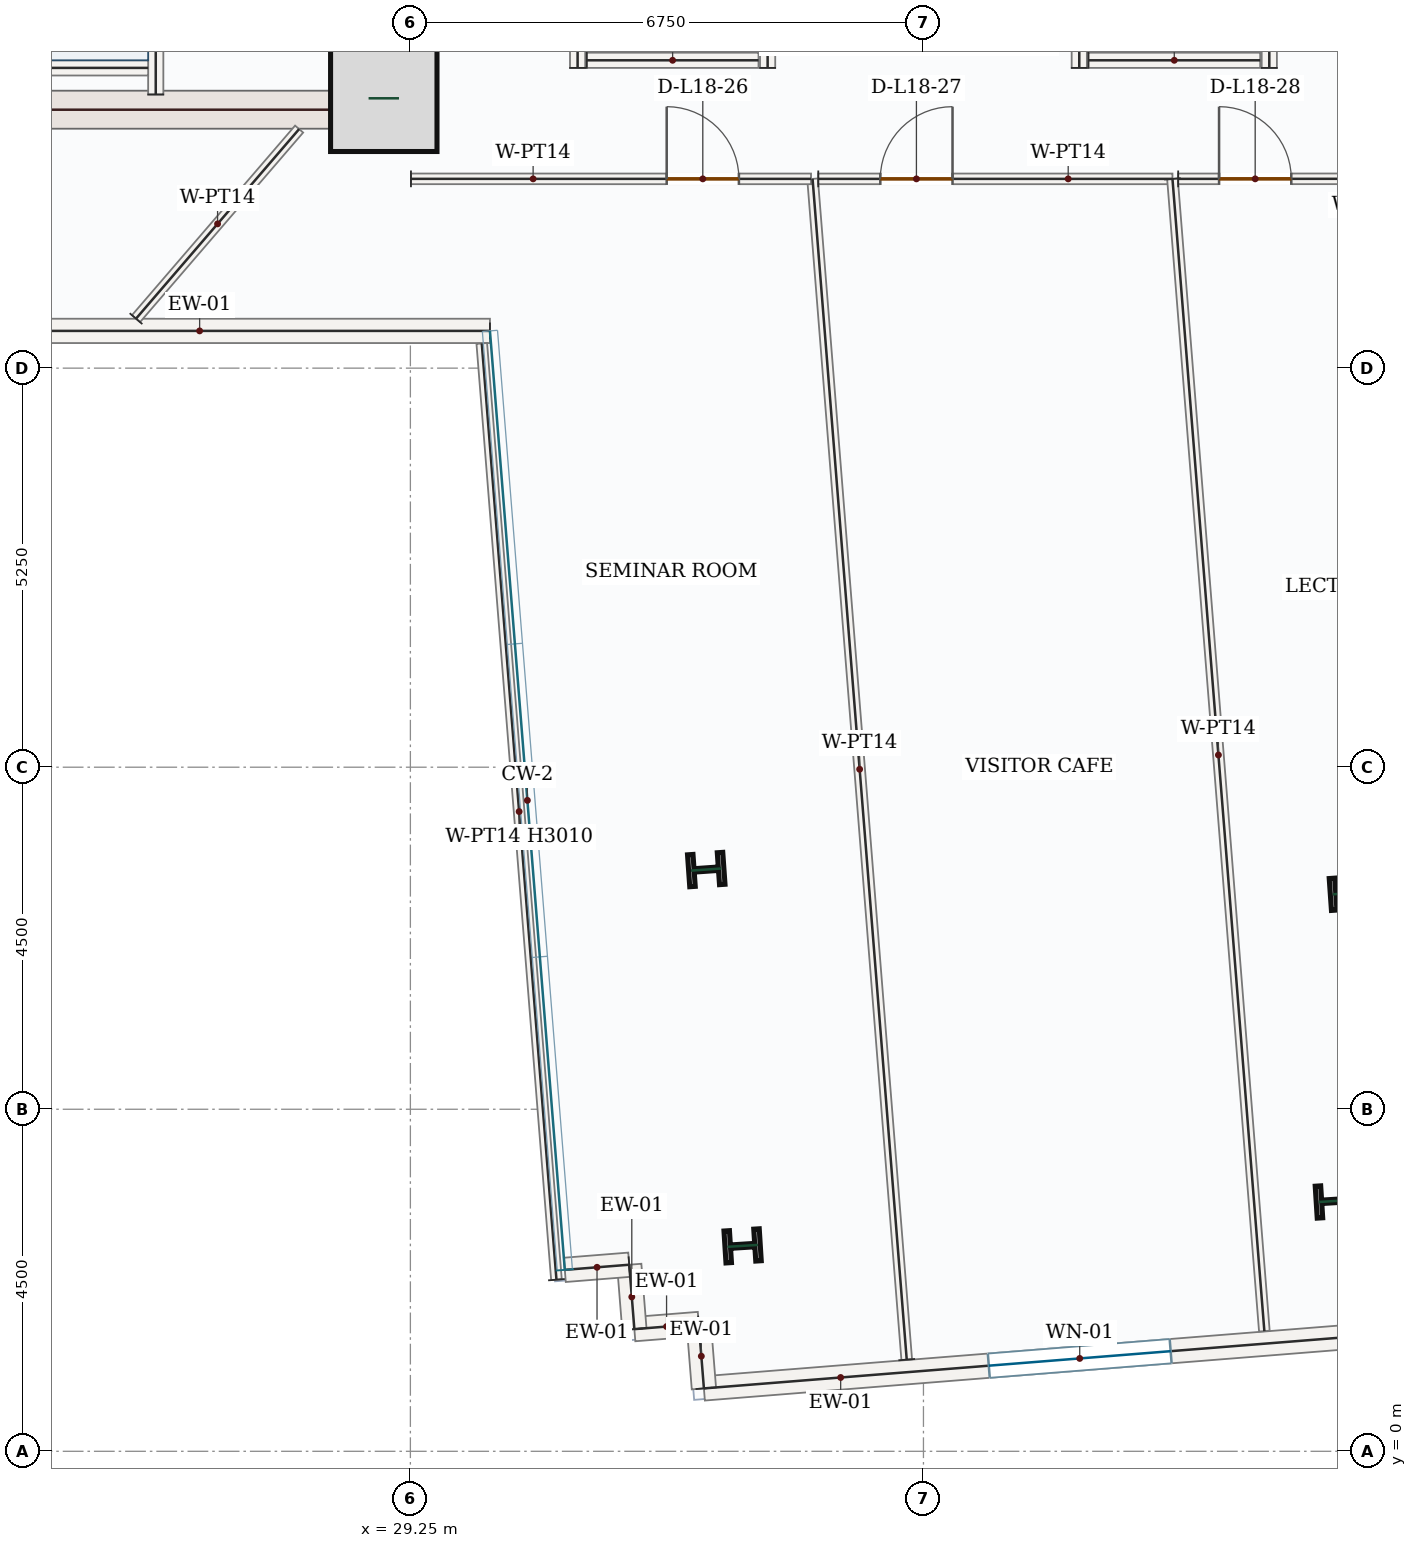
"""IFC4 building model, lengths in metres.
Left out: names, types, materials, properties, quantities, classifications, styles, units other than length and angle.
Written with IfcOpenShell. Run it as: python <this file> out.ifc"""

import sys

from ifc_helpers import new_model, si_unit, direction, frame, frame_2d, origin, origin_2d, place, context, subcontext, project, spatial, rectangle, i_section, extrude, source, transform, mapped, element, fill, save


model = new_model("IFC4")
c1 = context("Model", 3, precision=1e-05, world=origin(), true_north=direction((0.0, 1.0)))
c2 = subcontext(c1, "Body", "Model", "MODEL_VIEW")
j1 = project(units=[si_unit("LENGTHUNIT", "METRE"), si_unit("PLANEANGLEUNIT", "RADIAN")], contexts=[c1])
p1 = place(None, origin())
s1 = spatial("IfcSite", under=j1, at=p1, CompositionType="ELEMENT")
p2 = place(p1, origin())
s2 = spatial("IfcBuilding", under=s1, at=p2, CompositionType="ELEMENT")
p3 = place(p2, frame((0.0, 0.0, 83.7)))
s3 = spatial("IfcBuildingStorey", under=s2, at=p3, CompositionType="ELEMENT", Elevation=83.7)
p4 = place(p3, frame((29.0, 17.4, 0.0), z_axis=(0.0, 0.0, 1.0), x_axis=(0.0, 1.0, 0.0)))
e1 = element("IfcWall", 1, at=p4, inside=s3, PredefinedType="SHEAR", context=c2, shape_type="SweptSolid", body=[
    extrude(rectangle(XDim=8.55, YDim=0.5, at=frame_2d((4.275, 0.0))), origin(), (0.0, 0.0, 1.0), 3.95),
])
p5 = place(p4, frame((6.65, 0.0, 0.0)))
e2 = element("IfcOpeningElement", 2, at=p5, cuts=e1, PredefinedType="OPENING", context=c2, shape_type="SweptSolid", body=[
    extrude(rectangle(XDim=1.1, YDim=2.2, at=frame_2d((0.55, 1.1))), frame((0.0, 0.26, 0.0), z_axis=(0.0, -1.0, 0.0), x_axis=(1.0, 0.0, 0.0)), (0.0, 0.0, 1.0), 0.52),
])
p6 = place(p4, frame((2.15, 0.0, 0.0)))
e3 = element("IfcOpeningElement", 3, at=p6, cuts=e1, PredefinedType="OPENING", context=c2, shape_type="SweptSolid", body=[
    extrude(rectangle(XDim=0.88, YDim=2.1, at=frame_2d((0.44, 1.05))), frame((0.0, 0.26, 0.0), z_axis=(0.0, -1.0, 0.0), x_axis=(1.0, 0.0, 0.0)), (0.0, 0.0, 1.0), 0.52),
])
p7 = place(p4, frame((4.25, 0.0, 0.0)))
e4 = element("IfcOpeningElement", 4, at=p7, cuts=e1, PredefinedType="OPENING", context=c2, shape_type="SweptSolid", body=[
    extrude(rectangle(XDim=0.88, YDim=2.1, at=frame_2d((0.44, 1.05))), frame((0.0, 0.26, 0.0), z_axis=(0.0, -1.0, 0.0), x_axis=(1.0, 0.0, 0.0)), (0.0, 0.0, 1.0), 0.52),
])
m1 = source(origin(), c2, "Body", "SweptSolid", [
    extrude(rectangle(XDim=7.0, YDim=0.5, at=frame_2d((3.5, 0.0))), origin(), (0.0, 0.0, 1.0), 3.95),
])
p8 = place(p3, frame((21.75, 17.65, 0.0), z_axis=(0.0, 0.0, 1.0), x_axis=(1.0, 0.0, 0.0)))
e5 = element("IfcWall", 5, at=p8, inside=s3, PredefinedType="SHEAR", context=c2, shape_type="MappedRepresentation", body=[
    mapped(m1, transform((0.0, 0.0, 0.0), x_axis=(1.0, 0.0, 0.0), y_axis=(0.0, 1.0, 0.0), z_axis=(0.0, 0.0, 1.0), scale=1.0)),
])
m2 = source(origin(), c2, "Body", "SweptSolid", [
    extrude(rectangle(XDim=1.4, YDim=1.4, at=origin_2d()), origin(), (0.0, 0.0, 1.0), 4.2),
])
p9 = place(p3, frame((28.9, 17.8, 0.0), z_axis=(0.0, 0.0, 1.0), x_axis=(1.0, 0.0, 0.0)))
e6 = element("IfcColumn", 6, at=p9, inside=s3, PredefinedType="COLUMN", context=c2, shape_type="MappedRepresentation", body=[
    mapped(m2, transform((0.0, 0.0, 0.0), x_axis=(1.0, 0.0, 0.0), y_axis=(0.0, 1.0, 0.0), z_axis=(0.0, 0.0, 1.0), scale=1.0)),
])
m3 = source(origin(), c2, "Body", "SweptSolid", [
    extrude(i_section(OverallWidth=0.421, OverallDepth=0.465, WebThickness=0.045, FlangeThickness=0.073, FilletRadius=0.018, at=origin_2d()), origin(), (0.0, 0.0, 1.0), 4.2),
])
for number, where, z_axis, x_axis in (
    (7, (33.143, 7.654, 0.0), (0.0, 0.0, 1.0), (-0.07, 0.998, 0.0)),
    (8, (41.585, 7.342, 0.0), (0.0, 0.0, 1.0), (-0.07, 0.998, 0.0)),
    (9, (33.621, 2.703, 0.0), (0.0, 0.0, 1.0), (-0.063, 0.998, 0.0)),
    (10, (41.399, 3.292, 0.0), (0.0, 0.0, 1.0), (-0.063, 0.998, 0.0)),
):
    element("IfcColumn", number, at=place(p3, frame(where, z_axis=z_axis, x_axis=x_axis)), inside=s3, PredefinedType="COLUMN", context=c2, shape_type="MappedRepresentation", body=[
        mapped(m3, transform((0.0, 0.0, 0.0), x_axis=(1.0, 0.0, 0.0), y_axis=(0.0, 1.0, 0.0), z_axis=(0.0, 0.0, 1.0), scale=1.0)),
    ])
p10 = place(p3, frame((43.0, 1.616, 0.0), z_axis=(0.0, 0.0, 1.0), x_axis=(-0.996833485558, -0.079517306731, 0.0)))
e11 = element("IfcWall", 11, at=p10, inside=s3, PredefinedType="SOLIDWALL", context=c2, shape_type="SweptSolid", body=[
    extrude(rectangle(XDim=9.92, YDim=0.32, at=frame_2d((4.96, 0.0))), origin(), (0.0, 0.0, 1.0), 3.95),
])
p11 = place(p10, frame((3.76, 0.0, 0.85)))
e12 = element("IfcOpeningElement", 12, at=p11, cuts=e11, PredefinedType="OPENING", context=c2, shape_type="SweptSolid", body=[
    extrude(rectangle(XDim=2.4, YDim=1.8, at=frame_2d((1.2, 0.9))), frame((0.0, 0.17, 0.0), z_axis=(0.0, -1.0, 0.0), x_axis=(1.0, 0.0, 0.0)), (0.0, 0.0, 1.0), 0.34),
])
m4 = source(origin(), c2, "Body", "SweptSolid", [
    extrude(rectangle(XDim=0.85, YDim=0.32, at=frame_2d((0.425, 0.0))), origin(), (0.0, 0.0, 1.0), 3.95),
])
p12 = place(p3, frame((33.112, 0.827, 0.0), z_axis=(0.0, 0.0, 1.0), x_axis=(-0.079551174585, 0.996830783344, 0.0)))
e13 = element("IfcWall", 13, at=p12, inside=s3, PredefinedType="SOLIDWALL", context=c2, shape_type="MappedRepresentation", body=[
    mapped(m4, transform((0.0, 0.0, 0.0), x_axis=(1.0, 0.0, 0.0), y_axis=(0.0, 1.0, 0.0), z_axis=(0.0, 0.0, 1.0), scale=1.0)),
])
m5 = source(origin(), c2, "Body", "SweptSolid", [
    extrude(rectangle(XDim=0.85, YDim=0.32, at=frame_2d((0.425, 0.0))), origin(), (0.0, 0.0, 1.0), 3.95),
])
for number, where, z_axis, x_axis in (
    (14, (33.044, 1.675, 0.0), (0.0, 0.0, 1.0), (-0.997, -0.079, 0.0)),
    (15, (32.197, 1.607, 0.0), (0.0, 0.0, 1.0), (-0.08, 0.997, 0.0)),
):
    element("IfcWall", number, at=place(p3, frame(where, z_axis=z_axis, x_axis=x_axis)), inside=s3, PredefinedType="SOLIDWALL", context=c2, shape_type="MappedRepresentation", body=[
        mapped(m5, transform((0.0, 0.0, 0.0), x_axis=(1.0, 0.0, 0.0), y_axis=(0.0, 1.0, 0.0), z_axis=(0.0, 0.0, 1.0), scale=1.0)),
    ])
p13 = place(p3, frame((32.129, 2.455, 0.0), z_axis=(0.0, 0.0, 1.0), x_axis=(-0.996830783344, -0.079551174585, 0.0)))
e16 = element("IfcWall", 16, at=p13, inside=s3, PredefinedType="SOLIDWALL", context=c2, shape_type="MappedRepresentation", body=[
    mapped(m4, transform((0.0, 0.0, 0.0), x_axis=(1.0, 0.0, 0.0), y_axis=(0.0, 1.0, 0.0), z_axis=(0.0, 0.0, 1.0), scale=1.0)),
])
m6 = source(origin(), c2, "Body", "SweptSolid", [
    extrude(rectangle(XDim=7.639, YDim=0.32, at=frame_2d((3.819, 0.0))), origin(), (0.0, 0.0, 1.0), 3.95),
])
p14 = place(p3, frame((30.297, 14.74, 0.0), z_axis=(0.0, 0.0, 1.0), x_axis=(-1.0, 0.0, 0.0)))
e17 = element("IfcWall", 17, at=p14, inside=s3, PredefinedType="SOLIDWALL", context=c2, shape_type="MappedRepresentation", body=[
    mapped(m6, transform((0.0, 0.0, 0.0), x_axis=(1.0, 0.0, 0.0), y_axis=(0.0, 1.0, 0.0), z_axis=(0.0, 0.0, 1.0), scale=1.0)),
])
p15 = place(p3, frame((25.9, 17.85, 0.0), z_axis=(0.0, 0.0, 1.0), x_axis=(0.0, 1.0, 0.0)))
e18 = element("IfcWall", 18, at=p15, inside=s3, PredefinedType="SOLIDWALL", context=c2, shape_type="SweptSolid", body=[
    extrude(rectangle(XDim=8.0, YDim=0.2, at=frame_2d((4.0, 0.0))), origin(), (0.0, 0.0, 1.0), 3.95),
])
p16 = place(p15, frame((6.3, 0.0, 0.0)))
e19 = element("IfcOpeningElement", 19, at=p16, cuts=e18, PredefinedType="OPENING", context=c2, shape_type="SweptSolid", body=[
    extrude(rectangle(XDim=1.05, YDim=2.15, at=frame_2d((0.525, 1.075))), frame((0.0, 0.11, 0.0), z_axis=(0.0, -1.0, 0.0), x_axis=(1.0, 0.0, 0.0)), (0.0, 0.0, 1.0), 0.22),
])
m7 = source(origin(), c2, "Body", "SweptSolid", [
    extrude(rectangle(XDim=3.25, YDim=0.2, at=frame_2d((1.625, 0.0))), origin(), (0.0, 0.0, 1.0), 3.95),
])
p17 = place(p3, frame((22.55, 18.2, 0.0), z_axis=(0.0, 0.0, 1.0), x_axis=(1.0, 0.0, 0.0)))
e20 = element("IfcWall", 20, at=p17, inside=s3, PredefinedType="SOLIDWALL", context=c2, shape_type="MappedRepresentation", body=[
    mapped(m7, transform((0.0, 0.0, 0.0), x_axis=(1.0, 0.0, 0.0), y_axis=(0.0, 1.0, 0.0), z_axis=(0.0, 0.0, 1.0), scale=1.0)),
])
m8 = source(origin(), c2, "Body", "SweptSolid", [
    extrude(rectangle(XDim=2.35, YDim=0.2, at=frame_2d((1.175, 0.0))), origin(), (0.0, 0.0, 1.0), 3.95),
])
for number, where, z_axis, x_axis in (
    (21, (31.45, 18.2, 0.0), (0.0, 0.0, 1.0), (0.0, 1.0, 0.0)),
    (22, (33.95, 18.2, 0.0), (0.0, 0.0, 1.0), (0.0, 1.0, 0.0)),
):
    element("IfcWall", number, at=place(p3, frame(where, z_axis=z_axis, x_axis=x_axis)), inside=s3, PredefinedType="SOLIDWALL", context=c2, shape_type="MappedRepresentation", body=[
        mapped(m8, transform((0.0, 0.0, 0.0), x_axis=(1.0, 0.0, 0.0), y_axis=(0.0, 1.0, 0.0), z_axis=(0.0, 0.0, 1.0), scale=1.0)),
    ])
m9 = source(origin(), c2, "Body", "SweptSolid", [
    extrude(rectangle(XDim=2.26, YDim=0.2, at=frame_2d((1.13, 0.0))), origin(), (0.0, 0.0, 1.0), 3.95),
])
p18 = place(p3, frame((31.57, 18.3, 0.0), z_axis=(0.0, 0.0, 1.0), x_axis=(1.0, 0.0, 0.0)))
e23 = element("IfcWall", 23, at=p18, inside=s3, PredefinedType="SOLIDWALL", context=c2, shape_type="MappedRepresentation", body=[
    mapped(m9, transform((0.0, 0.0, 0.0), x_axis=(1.0, 0.0, 0.0), y_axis=(0.0, 1.0, 0.0), z_axis=(0.0, 0.0, 1.0), scale=1.0)),
])
for number, where, z_axis, x_axis in (
    (24, (38.05, 18.2, 0.0), (0.0, 0.0, 1.0), (0.0, 1.0, 0.0)),
    (25, (40.55, 18.2, 0.0), (0.0, 0.0, 1.0), (0.0, 1.0, 0.0)),
):
    element("IfcWall", number, at=place(p3, frame(where, z_axis=z_axis, x_axis=x_axis)), inside=s3, PredefinedType="SOLIDWALL", context=c2, shape_type="MappedRepresentation", body=[
        mapped(m8, transform((0.0, 0.0, 0.0), x_axis=(1.0, 0.0, 0.0), y_axis=(0.0, 1.0, 0.0), z_axis=(0.0, 0.0, 1.0), scale=1.0)),
    ])
p19 = place(p3, frame((38.17, 18.3, 0.0), z_axis=(0.0, 0.0, 1.0), x_axis=(1.0, 0.0, 0.0)))
e26 = element("IfcWall", 26, at=p19, inside=s3, PredefinedType="SOLIDWALL", context=c2, shape_type="MappedRepresentation", body=[
    mapped(m9, transform((0.0, 0.0, 0.0), x_axis=(1.0, 0.0, 0.0), y_axis=(0.0, 1.0, 0.0), z_axis=(0.0, 0.0, 1.0), scale=1.0)),
])
m10 = source(origin(), c2, "Body", "SweptSolid", [
    extrude(rectangle(XDim=15.583, YDim=0.14, at=frame_2d((7.792, 0.0))), origin(), (0.0, 0.0, 1.0), 3.95),
])
p20 = place(p3, frame((35.78, 1.206, 0.0), z_axis=(0.0, 0.0, 1.0), x_axis=(-0.079507979427, 0.996834229552, 0.0)))
e27 = element("IfcWall", 27, at=p20, inside=s3, PredefinedType="PARTITIONING", context=c2, shape_type="MappedRepresentation", body=[
    mapped(m10, transform((0.0, 0.0, 0.0), x_axis=(1.0, 0.0, 0.0), y_axis=(0.0, 1.0, 0.0), z_axis=(0.0, 0.0, 1.0), scale=1.0)),
])
p21 = place(p3, frame((34.616, 16.74, 0.0), z_axis=(0.0, 0.0, 1.0), x_axis=(1.0, 0.0, 0.0)))
e28 = element("IfcWall", 28, at=p21, inside=s3, PredefinedType="PARTITIONING", context=c2, shape_type="SweptSolid", body=[
    extrude(rectangle(XDim=4.66, YDim=0.14, at=frame_2d((2.33, 0.0))), origin(), (0.0, 0.0, 1.0), 3.95),
])
p22 = place(p21, frame((0.816, 0.0, 0.0)))
e29 = element("IfcOpeningElement", 29, at=p22, cuts=e28, PredefinedType="OPENING", context=c2, shape_type="SweptSolid", body=[
    extrude(rectangle(XDim=0.95, YDim=2.15, at=frame_2d((0.475, 1.075))), frame((0.0, 0.08, 0.0), z_axis=(0.0, -1.0, 0.0), x_axis=(1.0, 0.0, 0.0)), (0.0, 0.0, 1.0), 0.16),
])
m11 = source(origin(), c2, "Body", "SweptSolid", [
    extrude(rectangle(XDim=15.207, YDim=0.14, at=frame_2d((7.604, 0.0))), origin(), (0.0, 0.0, 1.0), 3.95),
])
p23 = place(p3, frame((39.276, 16.74, 0.0), z_axis=(0.0, 0.0, 1.0), x_axis=(0.07950146843, -0.996834748851, 0.0)))
e30 = element("IfcWall", 30, at=p23, inside=s3, PredefinedType="PARTITIONING", context=c2, shape_type="MappedRepresentation", body=[
    mapped(m11, transform((0.0, 0.0, 0.0), x_axis=(1.0, 0.0, 0.0), y_axis=(0.0, 1.0, 0.0), z_axis=(0.0, 0.0, 1.0), scale=1.0)),
])
p24 = place(p3, frame((39.351, 16.74, 0.0), z_axis=(0.0, 0.0, 1.0), x_axis=(0.999999935369, 0.000359531148, 0.0)))
e31 = element("IfcWall", 31, at=p24, inside=s3, PredefinedType="PARTITIONING", context=c2, shape_type="SweptSolid", body=[
    extrude(rectangle(XDim=3.395, YDim=0.14, at=frame_2d((1.698, 0.0))), origin(), (0.0, 0.0, 1.0), 3.95),
])
p25 = place(p24, frame((0.538, 0.0, 0.0)))
e32 = element("IfcOpeningElement", 32, at=p25, cuts=e31, PredefinedType="OPENING", context=c2, shape_type="SweptSolid", body=[
    extrude(rectangle(XDim=0.95, YDim=2.15, at=frame_2d((0.475, 1.075))), frame((0.0, 0.08, 0.0), z_axis=(0.0, -1.0, 0.0), x_axis=(1.0, 0.0, 0.0)), (0.0, 0.0, 1.0), 0.16),
])
p26 = place(p3, frame((29.258, 16.74, 0.0), z_axis=(0.0, 0.0, 1.0), x_axis=(0.999999998924, -4.6384341e-05, 0.0)))
e33 = element("IfcWall", 33, at=p26, inside=s3, PredefinedType="PARTITIONING", context=c2, shape_type="SweptSolid", body=[
    extrude(rectangle(XDim=5.263, YDim=0.14, at=frame_2d((2.632, 0.0))), origin(), (0.0, 0.0, 1.0), 3.95),
])
p27 = place(p26, frame((3.365, 0.0, 0.0)))
e34 = element("IfcOpeningElement", 34, at=p27, cuts=e33, PredefinedType="OPENING", context=c2, shape_type="SweptSolid", body=[
    extrude(rectangle(XDim=0.95, YDim=2.15, at=frame_2d((0.475, 1.075))), frame((0.0, 0.08, 0.0), z_axis=(0.0, -1.0, 0.0), x_axis=(1.0, 0.0, 0.0)), (0.0, 0.0, 1.0), 0.16),
])
m12 = source(origin(), c2, "Body", "SweptSolid", [
    extrude(rectangle(XDim=12.356, YDim=0.14, at=frame_2d((6.178, 0.0))), origin(), (0.0, 0.0, 1.0), 3.01),
])
p28 = place(p3, frame((31.172, 2.258, 0.0), z_axis=(0.0, 0.0, 1.0), x_axis=(-0.079527689156, 0.996832657299, 0.0)))
e35 = element("IfcWall", 35, at=p28, inside=s3, PredefinedType="PARTITIONING", context=c2, shape_type="MappedRepresentation", body=[
    mapped(m12, transform((0.0, 0.0, 0.0), x_axis=(1.0, 0.0, 0.0), y_axis=(0.0, 1.0, 0.0), z_axis=(0.0, 0.0, 1.0), scale=1.0)),
])
m13 = source(origin(), c2, "Body", "SweptSolid", [
    extrude(rectangle(XDim=3.29, YDim=0.14, at=frame_2d((1.645, 0.0))), origin(), (0.0, 0.0, 1.0), 3.95),
])
p29 = place(p3, frame((25.64, 14.901, 0.0), z_axis=(0.0, 0.0, 1.0), x_axis=(0.652214149627, 0.758034763732, 0.0)))
e36 = element("IfcWall", 36, at=p29, inside=s3, PredefinedType="PARTITIONING", context=c2, shape_type="MappedRepresentation", body=[
    mapped(m13, transform((0.0, 0.0, 0.0), x_axis=(1.0, 0.0, 0.0), y_axis=(0.0, 1.0, 0.0), z_axis=(0.0, 0.0, 1.0), scale=1.0)),
])
m14 = source(origin(), c2, "Body", "SweptSolid", [
    extrude(rectangle(XDim=2.4, YDim=1.8, at=frame_2d((1.2, 0.9))), frame((0.0, 0.03, 0.0), z_axis=(0.0, -1.0, 0.0), x_axis=(1.0, 0.0, 0.0)), (0.0, 0.0, 1.0), 0.06),
])
p30 = place(p11, origin())
e37 = element("IfcWindow", 37, at=p30, inside=s3, PartitioningType="DOUBLE_PANEL_VERTICAL", PredefinedType="WINDOW", context=c2, shape_type="MappedRepresentation", body=[
    mapped(m14, transform((0.0, 0.0, 0.0), x_axis=(1.0, 0.0, 0.0), y_axis=(0.0, 1.0, 0.0), z_axis=(0.0, 0.0, 1.0), scale=1.0)),
])
fill(e12, e37)
m15 = source(origin(), c2, "Body", "SweptSolid", [
    extrude(rectangle(XDim=0.95, YDim=2.15, at=frame_2d((0.475, 1.075))), frame((0.0, 0.025, 0.0), z_axis=(0.0, -1.0, 0.0), x_axis=(1.0, 0.0, 0.0)), (0.0, 0.0, 1.0), 0.05),
])
p31 = place(p27, origin())
e38 = element("IfcDoor", 38, at=p31, inside=s3, OperationType="SINGLE_SWING_LEFT", PredefinedType="DOOR", context=c2, shape_type="MappedRepresentation", body=[
    mapped(m15, transform((0.0, 0.0, 0.0), x_axis=(1.0, 0.0, 0.0), y_axis=(0.0, 1.0, 0.0), z_axis=(0.0, 0.0, 1.0), scale=1.0)),
])
fill(e34, e38)
p32 = place(p22, origin())
e39 = element("IfcDoor", 39, at=p32, inside=s3, OperationType="SINGLE_SWING_RIGHT", PredefinedType="DOOR", context=c2, shape_type="MappedRepresentation", body=[
    mapped(m15, transform((0.0, 0.0, 0.0), x_axis=(1.0, 0.0, 0.0), y_axis=(0.0, 1.0, 0.0), z_axis=(0.0, 0.0, 1.0), scale=1.0)),
])
fill(e29, e39)
p33 = place(p25, origin())
e40 = element("IfcDoor", 40, at=p33, inside=s3, OperationType="SINGLE_SWING_LEFT", PredefinedType="DOOR", context=c2, shape_type="MappedRepresentation", body=[
    mapped(m15, transform((0.0, 0.0, 0.0), x_axis=(1.0, 0.0, 0.0), y_axis=(0.0, 1.0, 0.0), z_axis=(0.0, 0.0, 1.0), scale=1.0)),
])
fill(e32, e40)
save(model, sys.argv[1])
